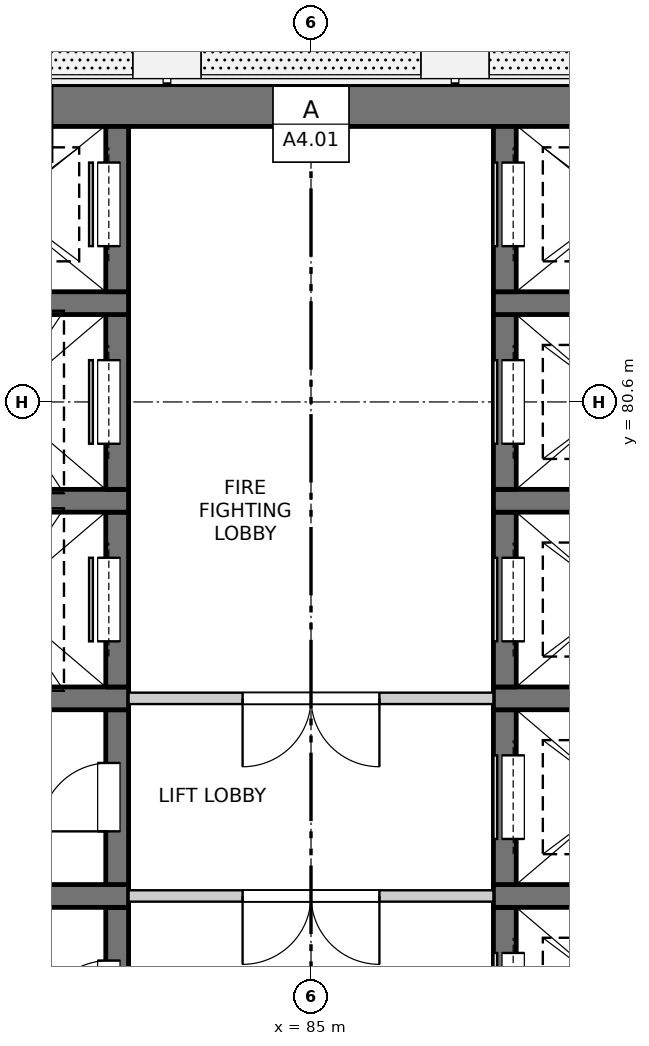
"""IFC4 building model, lengths in metres.
Left out: names, types, materials, properties, quantities, classifications, styles, units other than length and angle.
Written with IfcOpenShell. Run it as: python <this file> out.ifc"""

import sys

from ifc_helpers import new_model, si_unit, direction, frame, frame_2d, origin, place, context, subcontext, project, spatial, rectangle, extrude, element, fill, save


model = new_model("IFC4")
c1 = context("Model", 3, precision=1e-05, world=origin(), true_north=direction((0.0, 1.0)))
c2 = subcontext(c1, "Body", "Model", "MODEL_VIEW")
j1 = project(units=[si_unit("LENGTHUNIT", "METRE"), si_unit("PLANEANGLEUNIT", "RADIAN")], contexts=[c1])
p1 = place(None, origin())
s1 = spatial("IfcSite", under=j1, at=p1, CompositionType="ELEMENT")
p2 = place(p1, origin())
s2 = spatial("IfcBuilding", under=s1, at=p2, CompositionType="ELEMENT")
p3 = place(p2, frame((0.0, 0.0, 158.8)))
s3 = spatial("IfcBuildingStorey", under=s2, at=p3, CompositionType="ELEMENT", Elevation=158.8)
p4 = place(p3, frame((75.525, 84.5, -0.25), z_axis=(0.0, 0.0, 1.0), x_axis=(1.0, 0.0, 0.0)))
e1 = element("IfcWall", 1, at=p4, inside=s3, PredefinedType="SOLIDWALL", context=c2, shape_type="SweptSolid", body=[
    extrude(rectangle(XDim=18.95, YDim=0.55, at=frame_2d((9.475, 0.0))), origin(), (0.0, 0.0, 1.0), 3.4),
])
p5 = place(p3, frame((82.45, 71.65, -0.25), z_axis=(0.0, 0.0, 1.0), x_axis=(0.0, 1.0, 0.0)))
e2 = element("IfcWall", 2, at=p5, inside=s3, PredefinedType="SOLIDWALL", context=c2, shape_type="SweptSolid", body=[
    extrude(rectangle(XDim=2.3, YDim=0.3, at=frame_2d((1.15, 0.0))), origin(), (0.0, 0.0, 1.0), 3.4),
])
p6 = place(p5, frame((0.7, 0.0, 0.25)))
e3 = element("IfcOpeningElement", 3, at=p6, cuts=e2, PredefinedType="OPENING", context=c2, shape_type="SweptSolid", body=[
    extrude(rectangle(XDim=0.9, YDim=2.1, at=frame_2d((0.45, 1.05))), frame((0.0, 0.16, 0.0), z_axis=(0.0, -1.0, 0.0), x_axis=(1.0, 0.0, 0.0)), (0.0, 0.0, 1.0), 0.32),
])
p7 = place(p3, frame((79.6, 74.1, -0.25), z_axis=(0.0, 0.0, 1.0), x_axis=(1.0, 0.0, 0.0)))
e4 = element("IfcWall", 4, at=p7, inside=s3, PredefinedType="SOLIDWALL", context=c2, shape_type="SweptSolid", body=[
    extrude(rectangle(XDim=3.0, YDim=0.3, at=frame_2d((1.5, 0.0))), origin(), (0.0, 0.0, 1.0), 3.4),
])
p8 = place(p3, frame((82.45, 74.25, -0.25), z_axis=(0.0, 0.0, 1.0), x_axis=(0.0, 1.0, 0.0)))
e5 = element("IfcWall", 5, at=p8, inside=s3, PredefinedType="SOLIDWALL", context=c2, shape_type="SweptSolid", body=[
    extrude(rectangle(XDim=2.3, YDim=0.3, at=frame_2d((1.15, 0.0))), origin(), (0.0, 0.0, 1.0), 3.4),
])
p9 = place(p8, frame((0.7, 0.0, 0.25)))
e6 = element("IfcOpeningElement", 6, at=p9, cuts=e5, PredefinedType="OPENING", context=c2, shape_type="SweptSolid", body=[
    extrude(rectangle(XDim=0.9, YDim=2.1, at=frame_2d((0.45, 1.05))), frame((0.0, 0.16, 0.0), z_axis=(0.0, -1.0, 0.0), x_axis=(1.0, 0.0, 0.0)), (0.0, 0.0, 1.0), 0.32),
])
p10 = place(p3, frame((79.6, 76.7, -0.25), z_axis=(0.0, 0.0, 1.0), x_axis=(1.0, 0.0, 0.0)))
e7 = element("IfcWall", 7, at=p10, inside=s3, PredefinedType="SOLIDWALL", context=c2, shape_type="SweptSolid", body=[
    extrude(rectangle(XDim=3.0, YDim=0.3, at=frame_2d((1.5, 0.0))), origin(), (0.0, 0.0, 1.0), 3.4),
])
p11 = place(p3, frame((82.45, 76.85, -0.25), z_axis=(0.0, 0.0, 1.0), x_axis=(0.0, 1.0, 0.0)))
e8 = element("IfcWall", 8, at=p11, inside=s3, PredefinedType="SOLIDWALL", context=c2, shape_type="SweptSolid", body=[
    extrude(rectangle(XDim=2.3, YDim=0.3, at=frame_2d((1.15, 0.0))), origin(), (0.0, 0.0, 1.0), 3.4),
])
p12 = place(p11, frame((0.6, 0.0, 0.25)))
e9 = element("IfcOpeningElement", 9, at=p12, cuts=e8, PredefinedType="OPENING", context=c2, shape_type="SweptSolid", body=[
    extrude(rectangle(XDim=1.1, YDim=2.1, at=frame_2d((0.55, 1.05))), frame((0.0, 0.16, 0.0), z_axis=(0.0, -1.0, 0.0), x_axis=(1.0, 0.0, 0.0)), (0.0, 0.0, 1.0), 0.32),
])
p13 = place(p3, frame((79.6, 79.3, -0.25), z_axis=(0.0, 0.0, 1.0), x_axis=(1.0, 0.0, 0.0)))
e10 = element("IfcWall", 10, at=p13, inside=s3, PredefinedType="SOLIDWALL", context=c2, shape_type="SweptSolid", body=[
    extrude(rectangle(XDim=3.0, YDim=0.3, at=frame_2d((1.5, 0.0))), origin(), (0.0, 0.0, 1.0), 3.4),
])
p14 = place(p3, frame((82.45, 79.45, -0.25), z_axis=(0.0, 0.0, 1.0), x_axis=(0.0, 1.0, 0.0)))
e11 = element("IfcWall", 11, at=p14, inside=s3, PredefinedType="SOLIDWALL", context=c2, shape_type="SweptSolid", body=[
    extrude(rectangle(XDim=2.3, YDim=0.3, at=frame_2d((1.15, 0.0))), origin(), (0.0, 0.0, 1.0), 3.4),
])
p15 = place(p14, frame((0.6, 0.0, 0.25)))
e12 = element("IfcOpeningElement", 12, at=p15, cuts=e11, PredefinedType="OPENING", context=c2, shape_type="SweptSolid", body=[
    extrude(rectangle(XDim=1.1, YDim=2.1, at=frame_2d((0.55, 1.05))), frame((0.0, 0.16, 0.0), z_axis=(0.0, -1.0, 0.0), x_axis=(1.0, 0.0, 0.0)), (0.0, 0.0, 1.0), 0.32),
])
p16 = place(p3, frame((79.6, 81.9, -0.25), z_axis=(0.0, 0.0, 1.0), x_axis=(1.0, 0.0, 0.0)))
e13 = element("IfcWall", 13, at=p16, inside=s3, PredefinedType="SOLIDWALL", context=c2, shape_type="SweptSolid", body=[
    extrude(rectangle(XDim=3.0, YDim=0.3, at=frame_2d((1.5, 0.0))), origin(), (0.0, 0.0, 1.0), 3.4),
])
p17 = place(p3, frame((82.45, 82.05, -0.25), z_axis=(0.0, 0.0, 1.0), x_axis=(0.0, 1.0, 0.0)))
e14 = element("IfcWall", 14, at=p17, inside=s3, PredefinedType="SOLIDWALL", context=c2, shape_type="SweptSolid", body=[
    extrude(rectangle(XDim=2.175, YDim=0.3, at=frame_2d((1.087, 0.0))), origin(), (0.0, 0.0, 1.0), 3.4),
])
p18 = place(p17, frame((0.6, 0.0, 0.25)))
e15 = element("IfcOpeningElement", 15, at=p18, cuts=e14, PredefinedType="OPENING", context=c2, shape_type="SweptSolid", body=[
    extrude(rectangle(XDim=1.1, YDim=2.1, at=frame_2d((0.55, 1.05))), frame((0.0, 0.16, 0.0), z_axis=(0.0, -1.0, 0.0), x_axis=(1.0, 0.0, 0.0)), (0.0, 0.0, 1.0), 0.32),
])
p19 = place(p3, frame((87.55, 71.65, -0.25), z_axis=(0.0, 0.0, 1.0), x_axis=(0.0, 1.0, 0.0)))
e16 = element("IfcWall", 16, at=p19, inside=s3, PredefinedType="SOLIDWALL", context=c2, shape_type="SweptSolid", body=[
    extrude(rectangle(XDim=2.3, YDim=0.3, at=frame_2d((1.15, 0.0))), origin(), (0.0, 0.0, 1.0), 3.4),
])
p20 = place(p19, frame((0.6, 0.0, 0.25)))
e17 = element("IfcOpeningElement", 17, at=p20, cuts=e16, PredefinedType="OPENING", context=c2, shape_type="SweptSolid", body=[
    extrude(rectangle(XDim=1.1, YDim=2.1, at=frame_2d((0.55, 1.05))), frame((0.0, 0.16, 0.0), z_axis=(0.0, -1.0, 0.0), x_axis=(1.0, 0.0, 0.0)), (0.0, 0.0, 1.0), 0.32),
])
p21 = place(p3, frame((87.4, 74.1, -0.25), z_axis=(0.0, 0.0, 1.0), x_axis=(1.0, 0.0, 0.0)))
e18 = element("IfcWall", 18, at=p21, inside=s3, PredefinedType="SOLIDWALL", context=c2, shape_type="SweptSolid", body=[
    extrude(rectangle(XDim=3.0, YDim=0.3, at=frame_2d((1.5, 0.0))), origin(), (0.0, 0.0, 1.0), 3.4),
])
p22 = place(p3, frame((87.55, 74.25, -0.25), z_axis=(0.0, 0.0, 1.0), x_axis=(0.0, 1.0, 0.0)))
e19 = element("IfcWall", 19, at=p22, inside=s3, PredefinedType="SOLIDWALL", context=c2, shape_type="SweptSolid", body=[
    extrude(rectangle(XDim=2.3, YDim=0.3, at=frame_2d((1.15, 0.0))), origin(), (0.0, 0.0, 1.0), 3.4),
])
p23 = place(p22, frame((0.6, 0.0, 0.25)))
e20 = element("IfcOpeningElement", 20, at=p23, cuts=e19, PredefinedType="OPENING", context=c2, shape_type="SweptSolid", body=[
    extrude(rectangle(XDim=1.1, YDim=2.1, at=frame_2d((0.55, 1.05))), frame((0.0, 0.16, 0.0), z_axis=(0.0, -1.0, 0.0), x_axis=(1.0, 0.0, 0.0)), (0.0, 0.0, 1.0), 0.32),
])
p24 = place(p3, frame((87.4, 76.7, -0.25), z_axis=(0.0, 0.0, 1.0), x_axis=(1.0, 0.0, 0.0)))
e21 = element("IfcWall", 21, at=p24, inside=s3, PredefinedType="SOLIDWALL", context=c2, shape_type="SweptSolid", body=[
    extrude(rectangle(XDim=3.0, YDim=0.3, at=frame_2d((1.5, 0.0))), origin(), (0.0, 0.0, 1.0), 3.4),
])
p25 = place(p3, frame((87.55, 76.85, -0.25), z_axis=(0.0, 0.0, 1.0), x_axis=(0.0, 1.0, 0.0)))
e22 = element("IfcWall", 22, at=p25, inside=s3, PredefinedType="SOLIDWALL", context=c2, shape_type="SweptSolid", body=[
    extrude(rectangle(XDim=2.3, YDim=0.3, at=frame_2d((1.15, 0.0))), origin(), (0.0, 0.0, 1.0), 3.4),
])
p26 = place(p25, frame((0.6, 0.0, 0.25)))
e23 = element("IfcOpeningElement", 23, at=p26, cuts=e22, PredefinedType="OPENING", context=c2, shape_type="SweptSolid", body=[
    extrude(rectangle(XDim=1.1, YDim=2.1, at=frame_2d((0.55, 1.05))), frame((0.0, 0.16, 0.0), z_axis=(0.0, -1.0, 0.0), x_axis=(1.0, 0.0, 0.0)), (0.0, 0.0, 1.0), 0.32),
])
p27 = place(p3, frame((87.4, 79.3, -0.25), z_axis=(0.0, 0.0, 1.0), x_axis=(1.0, 0.0, 0.0)))
e24 = element("IfcWall", 24, at=p27, inside=s3, PredefinedType="SOLIDWALL", context=c2, shape_type="SweptSolid", body=[
    extrude(rectangle(XDim=3.0, YDim=0.3, at=frame_2d((1.5, 0.0))), origin(), (0.0, 0.0, 1.0), 3.4),
])
p28 = place(p3, frame((87.55, 79.45, -0.25), z_axis=(0.0, 0.0, 1.0), x_axis=(0.0, 1.0, 0.0)))
e25 = element("IfcWall", 25, at=p28, inside=s3, PredefinedType="SOLIDWALL", context=c2, shape_type="SweptSolid", body=[
    extrude(rectangle(XDim=2.3, YDim=0.3, at=frame_2d((1.15, 0.0))), origin(), (0.0, 0.0, 1.0), 3.4),
])
p29 = place(p28, frame((0.6, 0.0, 0.25)))
e26 = element("IfcOpeningElement", 26, at=p29, cuts=e25, PredefinedType="OPENING", context=c2, shape_type="SweptSolid", body=[
    extrude(rectangle(XDim=1.1, YDim=2.1, at=frame_2d((0.55, 1.05))), frame((0.0, 0.16, 0.0), z_axis=(0.0, -1.0, 0.0), x_axis=(1.0, 0.0, 0.0)), (0.0, 0.0, 1.0), 0.32),
])
p30 = place(p3, frame((87.4, 81.9, -0.25), z_axis=(0.0, 0.0, 1.0), x_axis=(1.0, 0.0, 0.0)))
e27 = element("IfcWall", 27, at=p30, inside=s3, PredefinedType="SOLIDWALL", context=c2, shape_type="SweptSolid", body=[
    extrude(rectangle(XDim=3.0, YDim=0.3, at=frame_2d((1.5, 0.0))), origin(), (0.0, 0.0, 1.0), 3.4),
])
p31 = place(p3, frame((87.55, 82.05, -0.25), z_axis=(0.0, 0.0, 1.0), x_axis=(0.0, 1.0, 0.0)))
e28 = element("IfcWall", 28, at=p31, inside=s3, PredefinedType="SOLIDWALL", context=c2, shape_type="SweptSolid", body=[
    extrude(rectangle(XDim=2.175, YDim=0.3, at=frame_2d((1.087, 0.0))), origin(), (0.0, 0.0, 1.0), 3.4),
])
p32 = place(p31, frame((0.6, 0.0, 0.25)))
e29 = element("IfcOpeningElement", 29, at=p32, cuts=e28, PredefinedType="OPENING", context=c2, shape_type="SweptSolid", body=[
    extrude(rectangle(XDim=1.1, YDim=2.1, at=frame_2d((0.55, 1.05))), frame((0.0, 0.16, 0.0), z_axis=(0.0, -1.0, 0.0), x_axis=(1.0, 0.0, 0.0)), (0.0, 0.0, 1.0), 0.32),
])
p33 = place(p3, frame((82.6, 74.1, 0.0), z_axis=(0.0, 0.0, 1.0), x_axis=(1.0, 0.0, 0.0)))
e30 = element("IfcWall", 30, at=p33, inside=s3, PredefinedType="PARTITIONING", context=c2, shape_type="SweptSolid", body=[
    extrude(rectangle(XDim=4.8, YDim=0.15, at=frame_2d((2.4, 0.0))), origin(), (0.0, 0.0, 1.0), 3.15),
])
p34 = place(p33, frame((1.5, 0.0, 0.0)))
e31 = element("IfcOpeningElement", 31, at=p34, cuts=e30, PredefinedType="OPENING", context=c2, shape_type="SweptSolid", body=[
    extrude(rectangle(XDim=1.8, YDim=2.1, at=frame_2d((0.9, 1.05))), frame((0.0, 0.085, 0.0), z_axis=(0.0, -1.0, 0.0), x_axis=(1.0, 0.0, 0.0)), (0.0, 0.0, 1.0), 0.17),
])
p35 = place(p3, frame((82.6, 76.7, 0.0), z_axis=(0.0, 0.0, 1.0), x_axis=(1.0, 0.0, 0.0)))
e32 = element("IfcWall", 32, at=p35, inside=s3, PredefinedType="PARTITIONING", context=c2, shape_type="SweptSolid", body=[
    extrude(rectangle(XDim=4.8, YDim=0.15, at=frame_2d((2.4, 0.0))), origin(), (0.0, 0.0, 1.0), 3.15),
])
p36 = place(p35, frame((1.5, 0.0, 0.0)))
e33 = element("IfcOpeningElement", 33, at=p36, cuts=e32, PredefinedType="OPENING", context=c2, shape_type="SweptSolid", body=[
    extrude(rectangle(XDim=1.8, YDim=2.1, at=frame_2d((0.9, 1.05))), frame((0.0, 0.085, 0.0), z_axis=(0.0, -1.0, 0.0), x_axis=(1.0, 0.0, 0.0)), (0.0, 0.0, 1.0), 0.17),
])
p37 = place(p6, origin())
e34 = element("IfcDoor", 34, at=p37, inside=s3, OperationType="SINGLE_SWING_LEFT", PredefinedType="DOOR", context=c2, shape_type="SweptSolid", body=[
    extrude(rectangle(XDim=0.9, YDim=2.1, at=frame_2d((0.45, 1.05))), frame((0.0, 0.135, 0.0), z_axis=(0.0, -1.0, 0.0), x_axis=(1.0, 0.0, 0.0)), (0.0, 0.0, 1.0), 0.05),
])
fill(e3, e34)
p38 = place(p20, origin())
e35 = element("IfcDoor", 35, at=p38, inside=s3, OperationType="SLIDING_TO_LEFT", PredefinedType="DOOR", context=c2, shape_type="SweptSolid", body=[
    extrude(rectangle(XDim=1.1, YDim=2.1, at=frame_2d((0.55, 1.05))), frame((0.0, -0.085, 0.0), z_axis=(0.0, -1.0, 0.0), x_axis=(1.0, 0.0, 0.0)), (0.0, 0.0, 1.0), 0.05),
])
fill(e17, e35)
p39 = place(p34, origin())
e36 = element("IfcDoor", 36, at=p39, inside=s3, OperationType="DOUBLE_DOOR_SINGLE_SWING", PredefinedType="DOOR", context=c2, shape_type="SweptSolid", body=[
    extrude(rectangle(XDim=1.8, YDim=2.1, at=frame_2d((0.9, 1.05))), frame((0.0, 0.025, 0.0), z_axis=(0.0, -1.0, 0.0), x_axis=(1.0, 0.0, 0.0)), (0.0, 0.0, 1.0), 0.05),
])
fill(e31, e36)
p40 = place(p9, origin())
e37 = element("IfcDoor", 37, at=p40, inside=s3, OperationType="SINGLE_SWING_LEFT", PredefinedType="DOOR", context=c2, shape_type="SweptSolid", body=[
    extrude(rectangle(XDim=0.9, YDim=2.1, at=frame_2d((0.45, 1.05))), frame((0.0, 0.135, 0.0), z_axis=(0.0, -1.0, 0.0), x_axis=(1.0, 0.0, 0.0)), (0.0, 0.0, 1.0), 0.05),
])
fill(e6, e37)
p41 = place(p23, origin())
e38 = element("IfcDoor", 38, at=p41, inside=s3, OperationType="SLIDING_TO_LEFT", PredefinedType="DOOR", context=c2, shape_type="SweptSolid", body=[
    extrude(rectangle(XDim=1.1, YDim=2.1, at=frame_2d((0.55, 1.05))), frame((0.0, -0.085, 0.0), z_axis=(0.0, -1.0, 0.0), x_axis=(1.0, 0.0, 0.0)), (0.0, 0.0, 1.0), 0.05),
])
fill(e20, e38)
p42 = place(p36, origin())
e39 = element("IfcDoor", 39, at=p42, inside=s3, OperationType="DOUBLE_DOOR_SINGLE_SWING", PredefinedType="DOOR", context=c2, shape_type="SweptSolid", body=[
    extrude(rectangle(XDim=1.8, YDim=2.1, at=frame_2d((0.9, 1.05))), frame((0.0, 0.025, 0.0), z_axis=(0.0, -1.0, 0.0), x_axis=(1.0, 0.0, 0.0)), (0.0, 0.0, 1.0), 0.05),
])
fill(e33, e39)
p43 = place(p12, origin())
e40 = element("IfcDoor", 40, at=p43, inside=s3, OperationType="SLIDING_TO_LEFT", PredefinedType="DOOR", context=c2, shape_type="SweptSolid", body=[
    extrude(rectangle(XDim=1.1, YDim=2.1, at=frame_2d((0.55, 1.05))), frame((0.0, 0.135, 0.0), z_axis=(0.0, -1.0, 0.0), x_axis=(1.0, 0.0, 0.0)), (0.0, 0.0, 1.0), 0.05),
])
fill(e9, e40)
p44 = place(p26, origin())
e41 = element("IfcDoor", 41, at=p44, inside=s3, OperationType="SLIDING_TO_LEFT", PredefinedType="DOOR", context=c2, shape_type="SweptSolid", body=[
    extrude(rectangle(XDim=1.1, YDim=2.1, at=frame_2d((0.55, 1.05))), frame((0.0, -0.085, 0.0), z_axis=(0.0, -1.0, 0.0), x_axis=(1.0, 0.0, 0.0)), (0.0, 0.0, 1.0), 0.05),
])
fill(e23, e41)
p45 = place(p15, origin())
e42 = element("IfcDoor", 42, at=p45, inside=s3, OperationType="SLIDING_TO_LEFT", PredefinedType="DOOR", context=c2, shape_type="SweptSolid", body=[
    extrude(rectangle(XDim=1.1, YDim=2.1, at=frame_2d((0.55, 1.05))), frame((0.0, 0.135, 0.0), z_axis=(0.0, -1.0, 0.0), x_axis=(1.0, 0.0, 0.0)), (0.0, 0.0, 1.0), 0.05),
])
fill(e12, e42)
p46 = place(p29, origin())
e43 = element("IfcDoor", 43, at=p46, inside=s3, OperationType="SLIDING_TO_RIGHT", PredefinedType="DOOR", context=c2, shape_type="SweptSolid", body=[
    extrude(rectangle(XDim=1.1, YDim=2.1, at=frame_2d((0.55, 1.05))), frame((0.0, -0.085, 0.0), z_axis=(0.0, -1.0, 0.0), x_axis=(1.0, 0.0, 0.0)), (0.0, 0.0, 1.0), 0.05),
])
fill(e26, e43)
p47 = place(p18, origin())
e44 = element("IfcDoor", 44, at=p47, inside=s3, OperationType="SLIDING_TO_RIGHT", PredefinedType="DOOR", context=c2, shape_type="SweptSolid", body=[
    extrude(rectangle(XDim=1.1, YDim=2.1, at=frame_2d((0.55, 1.05))), frame((0.0, 0.135, 0.0), z_axis=(0.0, -1.0, 0.0), x_axis=(1.0, 0.0, 0.0)), (0.0, 0.0, 1.0), 0.05),
])
fill(e15, e44)
p48 = place(p32, origin())
e45 = element("IfcDoor", 45, at=p48, inside=s3, OperationType="SLIDING_TO_RIGHT", PredefinedType="DOOR", context=c2, shape_type="SweptSolid", body=[
    extrude(rectangle(XDim=1.1, YDim=2.1, at=frame_2d((0.55, 1.05))), frame((0.0, -0.085, 0.0), z_axis=(0.0, -1.0, 0.0), x_axis=(1.0, 0.0, 0.0)), (0.0, 0.0, 1.0), 0.05),
])
fill(e29, e45)
save(model, sys.argv[1])
